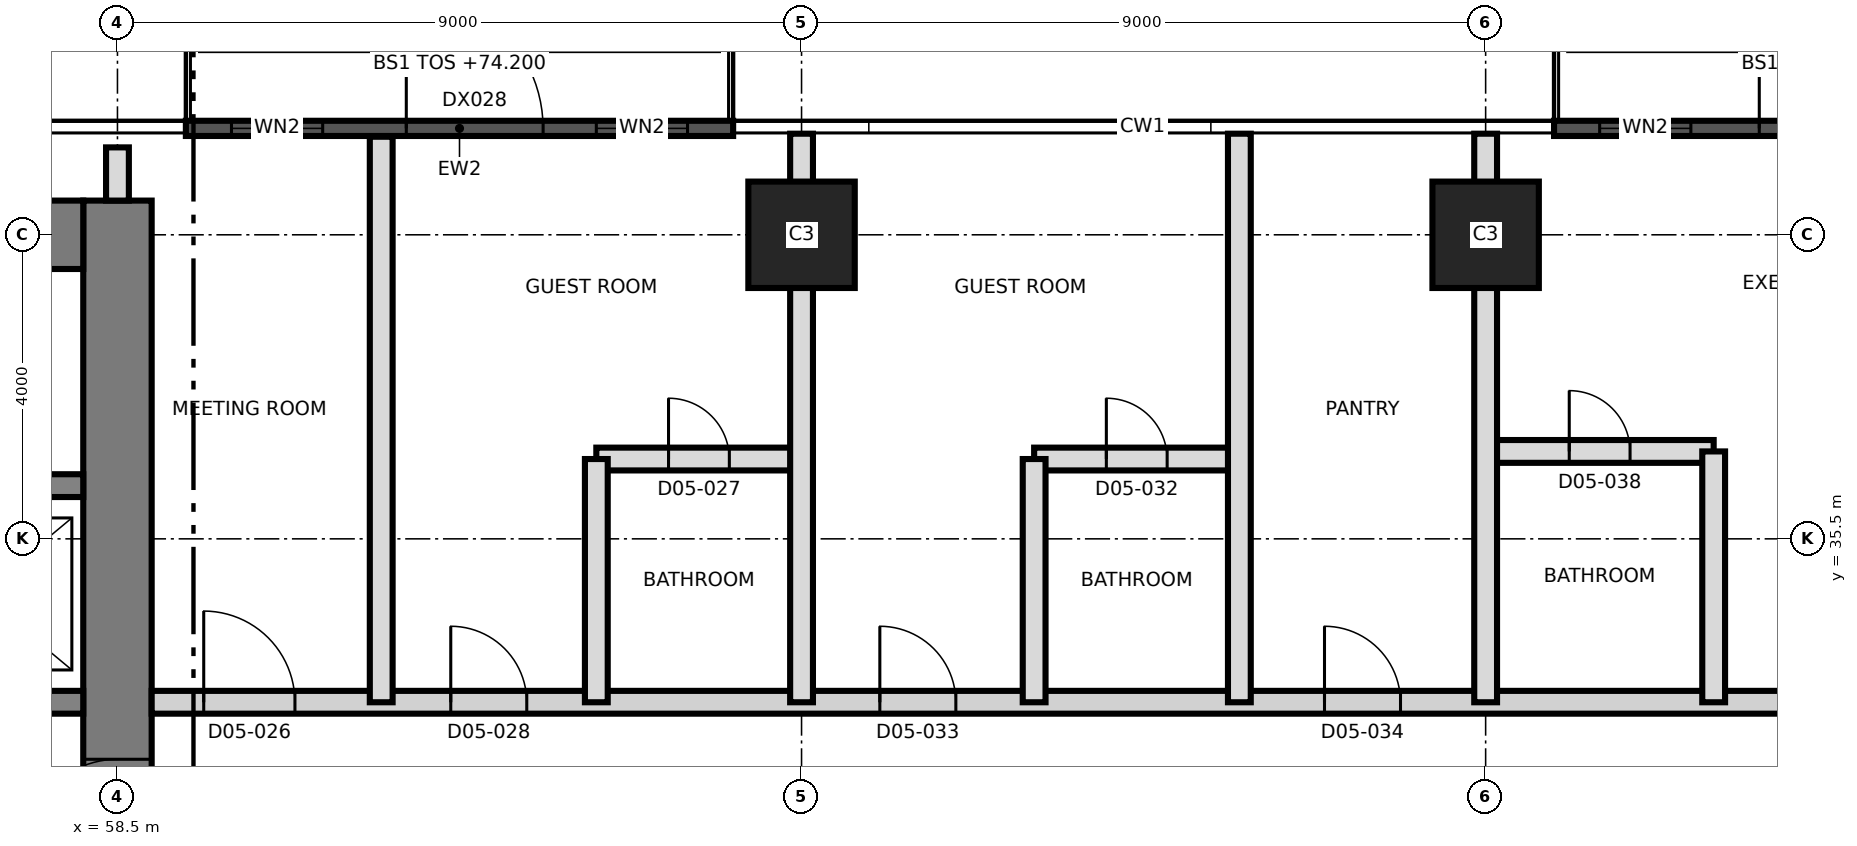
"""IFC4 building model, lengths in metres.
Left out: names, types, materials, properties, quantities, classifications, styles, units other than length and angle.
Written with IfcOpenShell. Run it as: python <this file> out.ifc"""

import sys

from ifc_helpers import new_model, si_unit, direction, frame, frame_2d, origin, origin_2d, place, context, subcontext, project, spatial, rectangle, extrude, element, fill, save


model = new_model("IFC4")
c1 = context("Model", 3, precision=1e-05, world=origin(), true_north=direction((0.0, 1.0)))
c2 = subcontext(c1, "Body", "Model", "MODEL_VIEW")
j1 = project(units=[si_unit("LENGTHUNIT", "METRE"), si_unit("PLANEANGLEUNIT", "RADIAN")], contexts=[c1])
p1 = place(None, origin())
s1 = spatial("IfcSite", under=j1, at=p1, CompositionType="ELEMENT")
p2 = place(p1, origin())
s2 = spatial("IfcBuilding", under=s1, at=p2, CompositionType="ELEMENT")
p3 = place(p2, frame((0.0, 0.0, 74.2)))
s3 = spatial("IfcBuildingStorey", under=s2, at=p3, CompositionType="ELEMENT", Elevation=74.2)
p4 = place(p3, frame((58.5, 21.05, 0.0), z_axis=(0.0, 0.0, 1.0), x_axis=(0.0, 1.0, 0.0)))
e1 = element("IfcWall", 1, at=p4, inside=s3, PredefinedType="SHEAR", context=c2, shape_type="SweptSolid", body=[
    extrude(rectangle(XDim=18.9, YDim=0.9, at=frame_2d((9.45, 0.0))), origin(), (0.0, 0.0, 1.0), 3.7),
])
p5 = place(p4, frame((10.35, 0.0, 0.0)))
e2 = element("IfcOpeningElement", 2, at=p5, cuts=e1, PredefinedType="OPENING", context=c2, shape_type="SweptSolid", body=[
    extrude(rectangle(XDim=1.2, YDim=2.1, at=frame_2d((0.6, 1.05))), frame((0.0, 0.46, 0.0), z_axis=(0.0, -1.0, 0.0), x_axis=(1.0, 0.0, 0.0)), (0.0, 0.0, 1.0), 0.92),
])
p6 = place(p3, frame((31.05, 39.5, 0.0), z_axis=(0.0, 0.0, 1.0), x_axis=(1.0, 0.0, 0.0)))
e3 = element("IfcWall", 3, at=p6, inside=s3, PredefinedType="SHEAR", context=c2, shape_type="SweptSolid", body=[
    extrude(rectangle(XDim=27.0, YDim=0.9, at=frame_2d((13.5, 0.0))), origin(), (0.0, 0.0, 1.0), 3.7),
])
p7 = place(p6, frame((10.65, 0.0, 0.0)))
e4 = element("IfcOpeningElement", 4, at=p7, cuts=e3, PredefinedType="OPENING", context=c2, shape_type="SweptSolid", body=[
    extrude(rectangle(XDim=1.2, YDim=2.1, at=frame_2d((0.6, 1.05))), frame((0.0, 0.46, 0.0), z_axis=(0.0, -1.0, 0.0), x_axis=(1.0, 0.0, 0.0)), (0.0, 0.0, 1.0), 0.92),
])
p8 = place(p3, frame((31.95, 33.35, 0.0), z_axis=(0.0, 0.0, 1.0), x_axis=(1.0, 0.0, 0.0)))
e5 = element("IfcWall", 5, at=p8, inside=s3, PredefinedType="SHEAR", context=c2, shape_type="SweptSolid", body=[
    extrude(rectangle(XDim=26.1, YDim=0.3, at=frame_2d((13.05, 0.0))), origin(), (0.0, 0.0, 1.0), 3.7),
])
p9 = place(p8, frame((13.7, 0.0, 0.0)))
e6 = element("IfcOpeningElement", 6, at=p9, cuts=e5, PredefinedType="OPENING", context=c2, shape_type="SweptSolid", body=[
    extrude(rectangle(XDim=1.4, YDim=2.1, at=frame_2d((0.7, 1.05))), frame((0.0, 0.16, 0.0), z_axis=(0.0, -1.0, 0.0), x_axis=(1.0, 0.0, 0.0)), (0.0, 0.0, 1.0), 0.32),
])
p10 = place(p8, frame((5.175, 0.0, 0.0)))
e7 = element("IfcOpeningElement", 7, at=p10, cuts=e5, PredefinedType="OPENING", context=c2, shape_type="SweptSolid", body=[
    extrude(rectangle(XDim=1.2, YDim=2.1, at=frame_2d((0.6, 1.05))), frame((0.0, 0.16, 0.0), z_axis=(0.0, -1.0, 0.0), x_axis=(1.0, 0.0, 0.0)), (0.0, 0.0, 1.0), 0.32),
])
p11 = place(p8, frame((19.725, 0.0, 0.0)))
e8 = element("IfcOpeningElement", 8, at=p11, cuts=e5, PredefinedType="OPENING", context=c2, shape_type="SweptSolid", body=[
    extrude(rectangle(XDim=1.2, YDim=2.1, at=frame_2d((0.6, 1.05))), frame((0.0, 0.16, 0.0), z_axis=(0.0, -1.0, 0.0), x_axis=(1.0, 0.0, 0.0)), (0.0, 0.0, 1.0), 0.32),
])
p12 = place(p3, frame((43.5, 36.2, 0.0), z_axis=(0.0, 0.0, 1.0), x_axis=(1.0, 0.0, 0.0)))
e9 = element("IfcWall", 9, at=p12, inside=s3, PredefinedType="SHEAR", context=c2, shape_type="SweptSolid", body=[
    extrude(rectangle(XDim=14.55, YDim=0.3, at=frame_2d((7.275, 0.0))), origin(), (0.0, 0.0, 1.0), 3.7),
])
p13 = place(p12, frame((6.9, 0.0, 0.0)))
e10 = element("IfcOpeningElement", 10, at=p13, cuts=e9, PredefinedType="OPENING", context=c2, shape_type="SweptSolid", body=[
    extrude(rectangle(XDim=1.2, YDim=2.1, at=frame_2d((0.6, 1.05))), frame((0.0, 0.16, 0.0), z_axis=(0.0, -1.0, 0.0), x_axis=(1.0, 0.0, 0.0)), (0.0, 0.0, 1.0), 0.32),
])
p14 = place(p12, frame((0.7, 0.0, 0.0)))
e11 = element("IfcOpeningElement", 11, at=p14, cuts=e9, PredefinedType="OPENING", context=c2, shape_type="SweptSolid", body=[
    extrude(rectangle(XDim=1.3, YDim=2.4, at=frame_2d((0.65, 1.2))), frame((0.0, 0.16, 0.0), z_axis=(0.0, -1.0, 0.0), x_axis=(1.0, 0.0, 0.0)), (0.0, 0.0, 1.0), 0.32),
])
p15 = place(p12, frame((3.7, 0.0, 0.0)))
e12 = element("IfcOpeningElement", 12, at=p15, cuts=e9, PredefinedType="OPENING", context=c2, shape_type="SweptSolid", body=[
    extrude(rectangle(XDim=1.3, YDim=2.4, at=frame_2d((0.65, 1.2))), frame((0.0, 0.16, 0.0), z_axis=(0.0, -1.0, 0.0), x_axis=(1.0, 0.0, 0.0)), (0.0, 0.0, 1.0), 0.32),
])
for number, where, z_axis, x_axis in (
    (13, (67.5, 39.5, 0.0), (0.0, 0.0, 1.0), (1.0, 0.0, 0.0)),
    (14, (76.5, 39.5, 0.0), (0.0, 0.0, 1.0), (1.0, 0.0, 0.0)),
):
    element("IfcColumn", number, at=place(p3, frame(where, z_axis=z_axis, x_axis=x_axis)), inside=s3, PredefinedType="COLUMN", context=c2, shape_type="SweptSolid", body=[
        extrude(rectangle(XDim=1.4, YDim=1.4, at=origin_2d()), origin(), (0.0, 0.0, 1.0), 3.7),
    ])
p16 = place(p3, frame((77.4, 40.9, 0.0), z_axis=(0.0, 0.0, 1.0), x_axis=(1.0, 0.0, 0.0)))
e15 = element("IfcWall", 15, at=p16, inside=s3, PredefinedType="SOLIDWALL", context=c2, shape_type="SweptSolid", body=[
    extrude(rectangle(XDim=7.2, YDim=0.2, at=frame_2d((3.6, 0.0))), origin(), (0.0, 0.0, 1.0), 3.4),
])
p17 = place(p16, frame((2.7, 0.0, 0.0)))
e16 = element("IfcOpeningElement", 16, at=p17, cuts=e15, PredefinedType="OPENING", context=c2, shape_type="SweptSolid", body=[
    extrude(rectangle(XDim=1.8, YDim=2.4, at=frame_2d((0.9, 1.2))), frame((0.0, 0.11, 0.0), z_axis=(0.0, -1.0, 0.0), x_axis=(1.0, 0.0, 0.0)), (0.0, 0.0, 1.0), 0.22),
])
p18 = place(p16, frame((5.4, 0.0, 0.9)))
e17 = element("IfcOpeningElement", 17, at=p18, cuts=e15, PredefinedType="OPENING", context=c2, shape_type="SweptSolid", body=[
    extrude(rectangle(XDim=1.2, YDim=2.1, at=frame_2d((0.6, 1.05))), frame((0.0, 0.11, 0.0), z_axis=(0.0, -1.0, 0.0), x_axis=(1.0, 0.0, 0.0)), (0.0, 0.0, 1.0), 0.22),
])
p19 = place(p16, frame((0.6, 0.0, 0.9)))
e18 = element("IfcOpeningElement", 18, at=p19, cuts=e15, PredefinedType="OPENING", context=c2, shape_type="SweptSolid", body=[
    extrude(rectangle(XDim=1.2, YDim=2.1, at=frame_2d((0.6, 1.05))), frame((0.0, 0.11, 0.0), z_axis=(0.0, -1.0, 0.0), x_axis=(1.0, 0.0, 0.0)), (0.0, 0.0, 1.0), 0.22),
])
p20 = place(p3, frame((59.4, 40.9, 0.0), z_axis=(0.0, 0.0, 1.0), x_axis=(1.0, 0.0, 0.0)))
e19 = element("IfcWall", 19, at=p20, inside=s3, PredefinedType="SOLIDWALL", context=c2, shape_type="SweptSolid", body=[
    extrude(rectangle(XDim=7.2, YDim=0.2, at=frame_2d((3.6, 0.0))), origin(), (0.0, 0.0, 1.0), 3.4),
])
p21 = place(p20, frame((2.9, 0.0, 0.0)))
e20 = element("IfcOpeningElement", 20, at=p21, cuts=e19, PredefinedType="OPENING", context=c2, shape_type="SweptSolid", body=[
    extrude(rectangle(XDim=1.8, YDim=2.4, at=frame_2d((0.9, 1.2))), frame((0.0, 0.11, 0.0), z_axis=(0.0, -1.0, 0.0), x_axis=(1.0, 0.0, 0.0)), (0.0, 0.0, 1.0), 0.22),
])
p22 = place(p20, frame((5.4, 0.0, 0.9)))
e21 = element("IfcOpeningElement", 21, at=p22, cuts=e19, PredefinedType="OPENING", context=c2, shape_type="SweptSolid", body=[
    extrude(rectangle(XDim=1.2, YDim=2.1, at=frame_2d((0.6, 1.05))), frame((0.0, 0.11, 0.0), z_axis=(0.0, -1.0, 0.0), x_axis=(1.0, 0.0, 0.0)), (0.0, 0.0, 1.0), 0.22),
])
p23 = place(p20, frame((0.6, 0.0, 0.9)))
e22 = element("IfcOpeningElement", 22, at=p23, cuts=e19, PredefinedType="OPENING", context=c2, shape_type="SweptSolid", body=[
    extrude(rectangle(XDim=1.2, YDim=2.1, at=frame_2d((0.6, 1.05))), frame((0.0, 0.11, 0.0), z_axis=(0.0, -1.0, 0.0), x_axis=(1.0, 0.0, 0.0)), (0.0, 0.0, 1.0), 0.22),
])
p24 = place(p3, frame((58.95, 33.35, 0.0), z_axis=(0.0, 0.0, 1.0), x_axis=(1.0, 0.0, 0.0)))
e23 = element("IfcWall", 23, at=p24, inside=s3, PredefinedType="PARTITIONING", context=c2, shape_type="SweptSolid", body=[
    extrude(rectangle(XDim=26.38, YDim=0.3, at=frame_2d((13.19, 0.0))), origin(), (0.0, 0.0, 1.0), 3.4),
])
p25 = place(p24, frame((0.685, 0.0, 0.0)))
e24 = element("IfcOpeningElement", 24, at=p25, cuts=e23, PredefinedType="OPENING", context=c2, shape_type="SweptSolid", body=[
    extrude(rectangle(XDim=1.2, YDim=2.1, at=frame_2d((0.6, 1.05))), frame((0.0, 0.16, 0.0), z_axis=(0.0, -1.0, 0.0), x_axis=(1.0, 0.0, 0.0)), (0.0, 0.0, 1.0), 0.32),
])
p26 = place(p24, frame((3.935, 0.0, 0.0)))
e25 = element("IfcOpeningElement", 25, at=p26, cuts=e23, PredefinedType="OPENING", context=c2, shape_type="SweptSolid", body=[
    extrude(rectangle(XDim=1.0, YDim=2.1, at=frame_2d((0.5, 1.05))), frame((0.0, 0.16, 0.0), z_axis=(0.0, -1.0, 0.0), x_axis=(1.0, 0.0, 0.0)), (0.0, 0.0, 1.0), 0.32),
])
p27 = place(p24, frame((9.58, 0.0, 0.0)))
e26 = element("IfcOpeningElement", 26, at=p27, cuts=e23, PredefinedType="OPENING", context=c2, shape_type="SweptSolid", body=[
    extrude(rectangle(XDim=1.0, YDim=2.1, at=frame_2d((0.5, 1.05))), frame((0.0, 0.16, 0.0), z_axis=(0.0, -1.0, 0.0), x_axis=(1.0, 0.0, 0.0)), (0.0, 0.0, 1.0), 0.32),
])
p28 = place(p24, frame((15.43, 0.0, 0.0)))
e27 = element("IfcOpeningElement", 27, at=p28, cuts=e23, PredefinedType="OPENING", context=c2, shape_type="SweptSolid", body=[
    extrude(rectangle(XDim=1.0, YDim=2.1, at=frame_2d((0.5, 1.05))), frame((0.0, 0.16, 0.0), z_axis=(0.0, -1.0, 0.0), x_axis=(1.0, 0.0, 0.0)), (0.0, 0.0, 1.0), 0.32),
])
p29 = place(p24, frame((21.55, 0.0, 0.0)))
e28 = element("IfcOpeningElement", 28, at=p29, cuts=e23, PredefinedType="OPENING", context=c2, shape_type="SweptSolid", body=[
    extrude(rectangle(XDim=1.0, YDim=2.4, at=frame_2d((0.5, 1.2))), frame((0.0, 0.16, 0.0), z_axis=(0.0, -1.0, 0.0), x_axis=(1.0, 0.0, 0.0)), (0.0, 0.0, 1.0), 0.32),
])
p30 = place(p3, frame((64.8, 36.55, 0.0), z_axis=(0.0, 0.0, 1.0), x_axis=(1.0, 0.0, 0.0)))
e29 = element("IfcWall", 29, at=p30, inside=s3, PredefinedType="PARTITIONING", context=c2, shape_type="SweptSolid", body=[
    extrude(rectangle(XDim=2.7, YDim=0.3, at=frame_2d((1.35, 0.0))), origin(), (0.0, 0.0, 1.0), 3.4),
])
p31 = place(p30, frame((0.95, 0.0, 0.0)))
e30 = element("IfcOpeningElement", 30, at=p31, cuts=e29, PredefinedType="OPENING", context=c2, shape_type="SweptSolid", body=[
    extrude(rectangle(XDim=0.8, YDim=2.1, at=frame_2d((0.4, 1.05))), frame((0.0, 0.16, 0.0), z_axis=(0.0, -1.0, 0.0), x_axis=(1.0, 0.0, 0.0)), (0.0, 0.0, 1.0), 0.32),
])
p32 = place(p3, frame((70.56, 36.55, 0.0), z_axis=(0.0, 0.0, 1.0), x_axis=(1.0, 0.0, 0.0)))
e31 = element("IfcWall", 31, at=p32, inside=s3, PredefinedType="PARTITIONING", context=c2, shape_type="SweptSolid", body=[
    extrude(rectangle(XDim=2.7, YDim=0.3, at=frame_2d((1.35, 0.0))), origin(), (0.0, 0.0, 1.0), 3.4),
])
p33 = place(p32, frame((0.95, 0.0, 0.0)))
e32 = element("IfcOpeningElement", 32, at=p33, cuts=e31, PredefinedType="OPENING", context=c2, shape_type="SweptSolid", body=[
    extrude(rectangle(XDim=0.8, YDim=2.1, at=frame_2d((0.4, 1.05))), frame((0.0, 0.16, 0.0), z_axis=(0.0, -1.0, 0.0), x_axis=(1.0, 0.0, 0.0)), (0.0, 0.0, 1.0), 0.32),
])
p34 = place(p3, frame((76.5, 36.65, 0.0), z_axis=(0.0, 0.0, 1.0), x_axis=(1.0, 0.0, 0.0)))
e33 = element("IfcWall", 33, at=p34, inside=s3, PredefinedType="PARTITIONING", context=c2, shape_type="SweptSolid", body=[
    extrude(rectangle(XDim=3.0, YDim=0.3, at=frame_2d((1.5, 0.0))), origin(), (0.0, 0.0, 1.0), 3.4),
])
p35 = place(p34, frame((1.1, 0.0, 0.0)))
e34 = element("IfcOpeningElement", 34, at=p35, cuts=e33, PredefinedType="OPENING", context=c2, shape_type="SweptSolid", body=[
    extrude(rectangle(XDim=0.8, YDim=2.1, at=frame_2d((0.4, 1.05))), frame((0.0, 0.16, 0.0), z_axis=(0.0, -1.0, 0.0), x_axis=(1.0, 0.0, 0.0)), (0.0, 0.0, 1.0), 0.32),
])
p36 = place(p3, frame((58.5, 39.95, 0.0), z_axis=(0.0, 0.0, 1.0), x_axis=(0.0, 1.0, 0.0)))
e35 = element("IfcWall", 35, at=p36, inside=s3, PredefinedType="PARTITIONING", context=c2, shape_type="SweptSolid", body=[
    extrude(rectangle(XDim=0.7, YDim=0.3, at=frame_2d((0.35, 0.0))), origin(), (0.0, 0.0, 1.0), 3.4),
])
p37 = place(p3, frame((61.97, 33.35, 0.0), z_axis=(0.0, 0.0, 1.0), x_axis=(0.0, 1.0, 0.0)))
e36 = element("IfcWall", 36, at=p37, inside=s3, PredefinedType="PARTITIONING", context=c2, shape_type="SweptSolid", body=[
    extrude(rectangle(XDim=7.44, YDim=0.3, at=frame_2d((3.72, 0.0))), origin(), (0.0, 0.0, 1.0), 3.4),
])
p38 = place(p3, frame((64.8, 33.35, 0.0), z_axis=(0.0, 0.0, 1.0), x_axis=(0.0, 1.0, 0.0)))
e37 = element("IfcWall", 37, at=p38, inside=s3, PredefinedType="PARTITIONING", context=c2, shape_type="SweptSolid", body=[
    extrude(rectangle(XDim=3.2, YDim=0.3, at=frame_2d((1.6, 0.0))), origin(), (0.0, 0.0, 1.0), 3.4),
])
p39 = place(p3, frame((67.5, 33.35, 0.0), z_axis=(0.0, 0.0, 1.0), x_axis=(0.0, 1.0, 0.0)))
e38 = element("IfcWall", 38, at=p39, inside=s3, PredefinedType="PARTITIONING", context=c2, shape_type="SweptSolid", body=[
    extrude(rectangle(XDim=7.48, YDim=0.3, at=frame_2d((3.74, 0.0))), origin(), (0.0, 0.0, 1.0), 3.4),
])
p40 = place(p3, frame((70.56, 33.35, 0.0), z_axis=(0.0, 0.0, 1.0), x_axis=(0.0, 1.0, 0.0)))
e39 = element("IfcWall", 39, at=p40, inside=s3, PredefinedType="PARTITIONING", context=c2, shape_type="SweptSolid", body=[
    extrude(rectangle(XDim=3.2, YDim=0.3, at=frame_2d((1.6, 0.0))), origin(), (0.0, 0.0, 1.0), 3.4),
])
for number, where, z_axis, x_axis in (
    (40, (73.26, 33.35, 0.0), (0.0, 0.0, 1.0), (0.0, 1.0, 0.0)),
    (41, (76.5, 33.35, 0.0), (0.0, 0.0, 1.0), (0.0, 1.0, 0.0)),
):
    element("IfcWall", number, at=place(p3, frame(where, z_axis=z_axis, x_axis=x_axis)), inside=s3, PredefinedType="PARTITIONING", context=c2, shape_type="SweptSolid", body=[
        extrude(rectangle(XDim=7.48, YDim=0.3, at=frame_2d((3.74, 0.0))), origin(), (0.0, 0.0, 1.0), 3.4),
    ])
p41 = place(p3, frame((79.5, 33.35, 0.0), z_axis=(0.0, 0.0, 1.0), x_axis=(0.0, 1.0, 0.0)))
e42 = element("IfcWall", 42, at=p41, inside=s3, PredefinedType="PARTITIONING", context=c2, shape_type="SweptSolid", body=[
    extrude(rectangle(XDim=3.3, YDim=0.3, at=frame_2d((1.65, 0.0))), origin(), (0.0, 0.0, 1.0), 3.4),
])
p42 = place(p17, origin())
e43 = element("IfcDoor", 43, at=p42, inside=s3, OperationType="SINGLE_SWING_LEFT", PredefinedType="DOOR", context=c2, shape_type="SweptSolid", body=[
    extrude(rectangle(XDim=1.8, YDim=2.4, at=frame_2d((0.9, 1.2))), frame((0.0, 0.025, 0.0), z_axis=(0.0, -1.0, 0.0), x_axis=(1.0, 0.0, 0.0)), (0.0, 0.0, 1.0), 0.05),
])
fill(e16, e43)
p43 = place(p19, origin())
e44 = element("IfcWindow", 44, at=p43, inside=s3, PartitioningType="SINGLE_PANEL", PredefinedType="WINDOW", context=c2, shape_type="SweptSolid", body=[
    extrude(rectangle(XDim=1.2, YDim=2.1, at=frame_2d((0.6, 1.05))), frame((0.0, 0.03, 0.0), z_axis=(0.0, -1.0, 0.0), x_axis=(1.0, 0.0, 0.0)), (0.0, 0.0, 1.0), 0.06),
])
fill(e18, e44)
p44 = place(p21, origin())
e45 = element("IfcDoor", 45, at=p44, inside=s3, OperationType="SINGLE_SWING_LEFT", PredefinedType="DOOR", context=c2, shape_type="SweptSolid", body=[
    extrude(rectangle(XDim=1.8, YDim=2.4, at=frame_2d((0.9, 1.2))), frame((0.0, 0.025, 0.0), z_axis=(0.0, -1.0, 0.0), x_axis=(1.0, 0.0, 0.0)), (0.0, 0.0, 1.0), 0.05),
])
fill(e20, e45)
p45 = place(p22, origin())
e46 = element("IfcWindow", 46, at=p45, inside=s3, PartitioningType="SINGLE_PANEL", PredefinedType="WINDOW", context=c2, shape_type="SweptSolid", body=[
    extrude(rectangle(XDim=1.2, YDim=2.1, at=frame_2d((0.6, 1.05))), frame((0.0, 0.03, 0.0), z_axis=(0.0, -1.0, 0.0), x_axis=(1.0, 0.0, 0.0)), (0.0, 0.0, 1.0), 0.06),
])
fill(e21, e46)
p46 = place(p23, origin())
e47 = element("IfcWindow", 47, at=p46, inside=s3, PartitioningType="SINGLE_PANEL", PredefinedType="WINDOW", context=c2, shape_type="SweptSolid", body=[
    extrude(rectangle(XDim=1.2, YDim=2.1, at=frame_2d((0.6, 1.05))), frame((0.0, 0.03, 0.0), z_axis=(0.0, -1.0, 0.0), x_axis=(1.0, 0.0, 0.0)), (0.0, 0.0, 1.0), 0.06),
])
fill(e22, e47)
p47 = place(p5, origin())
e48 = element("IfcDoor", 48, at=p47, inside=s3, OperationType="SINGLE_SWING_LEFT", PredefinedType="DOOR", context=c2, shape_type="SweptSolid", body=[
    extrude(rectangle(XDim=1.2, YDim=2.1, at=frame_2d((0.6, 1.05))), frame((0.0, 0.025, 0.0), z_axis=(0.0, -1.0, 0.0), x_axis=(1.0, 0.0, 0.0)), (0.0, 0.0, 1.0), 0.05),
])
fill(e2, e48)
p48 = place(p25, origin())
e49 = element("IfcDoor", 49, at=p48, inside=s3, OperationType="SINGLE_SWING_LEFT", PredefinedType="DOOR", context=c2, shape_type="SweptSolid", body=[
    extrude(rectangle(XDim=1.2, YDim=2.1, at=frame_2d((0.6, 1.05))), frame((0.0, 0.025, 0.0), z_axis=(0.0, -1.0, 0.0), x_axis=(1.0, 0.0, 0.0)), (0.0, 0.0, 1.0), 0.05),
])
fill(e24, e49)
p49 = place(p31, origin())
e50 = element("IfcDoor", 50, at=p49, inside=s3, OperationType="SINGLE_SWING_RIGHT", PredefinedType="DOOR", context=c2, shape_type="SweptSolid", body=[
    extrude(rectangle(XDim=0.8, YDim=2.1, at=frame_2d((0.4, 1.05))), frame((0.0, 0.025, 0.0), z_axis=(0.0, -1.0, 0.0), x_axis=(1.0, 0.0, 0.0)), (0.0, 0.0, 1.0), 0.05),
])
fill(e30, e50)
p50 = place(p26, origin())
e51 = element("IfcDoor", 51, at=p50, inside=s3, OperationType="SINGLE_SWING_LEFT", PredefinedType="DOOR", context=c2, shape_type="SweptSolid", body=[
    extrude(rectangle(XDim=1.0, YDim=2.1, at=frame_2d((0.5, 1.05))), frame((0.0, 0.025, 0.0), z_axis=(0.0, -1.0, 0.0), x_axis=(1.0, 0.0, 0.0)), (0.0, 0.0, 1.0), 0.05),
])
fill(e25, e51)
p51 = place(p33, origin())
e52 = element("IfcDoor", 52, at=p51, inside=s3, OperationType="SINGLE_SWING_LEFT", PredefinedType="DOOR", context=c2, shape_type="SweptSolid", body=[
    extrude(rectangle(XDim=0.8, YDim=2.1, at=frame_2d((0.4, 1.05))), frame((0.0, 0.025, 0.0), z_axis=(0.0, -1.0, 0.0), x_axis=(1.0, 0.0, 0.0)), (0.0, 0.0, 1.0), 0.05),
])
fill(e32, e52)
p52 = place(p27, origin())
e53 = element("IfcDoor", 53, at=p52, inside=s3, OperationType="SINGLE_SWING_LEFT", PredefinedType="DOOR", context=c2, shape_type="SweptSolid", body=[
    extrude(rectangle(XDim=1.0, YDim=2.1, at=frame_2d((0.5, 1.05))), frame((0.0, 0.025, 0.0), z_axis=(0.0, -1.0, 0.0), x_axis=(1.0, 0.0, 0.0)), (0.0, 0.0, 1.0), 0.05),
])
fill(e26, e53)
p53 = place(p28, origin())
e54 = element("IfcDoor", 54, at=p53, inside=s3, OperationType="SINGLE_SWING_RIGHT", PredefinedType="DOOR", context=c2, shape_type="SweptSolid", body=[
    extrude(rectangle(XDim=1.0, YDim=2.1, at=frame_2d((0.5, 1.05))), frame((0.0, 0.025, 0.0), z_axis=(0.0, -1.0, 0.0), x_axis=(1.0, 0.0, 0.0)), (0.0, 0.0, 1.0), 0.05),
])
fill(e27, e54)
p54 = place(p35, origin())
e55 = element("IfcDoor", 55, at=p54, inside=s3, OperationType="SINGLE_SWING_LEFT", PredefinedType="DOOR", context=c2, shape_type="SweptSolid", body=[
    extrude(rectangle(XDim=0.8, YDim=2.1, at=frame_2d((0.4, 1.05))), frame((0.0, 0.025, 0.0), z_axis=(0.0, -1.0, 0.0), x_axis=(1.0, 0.0, 0.0)), (0.0, 0.0, 1.0), 0.05),
])
fill(e34, e55)
save(model, sys.argv[1])
